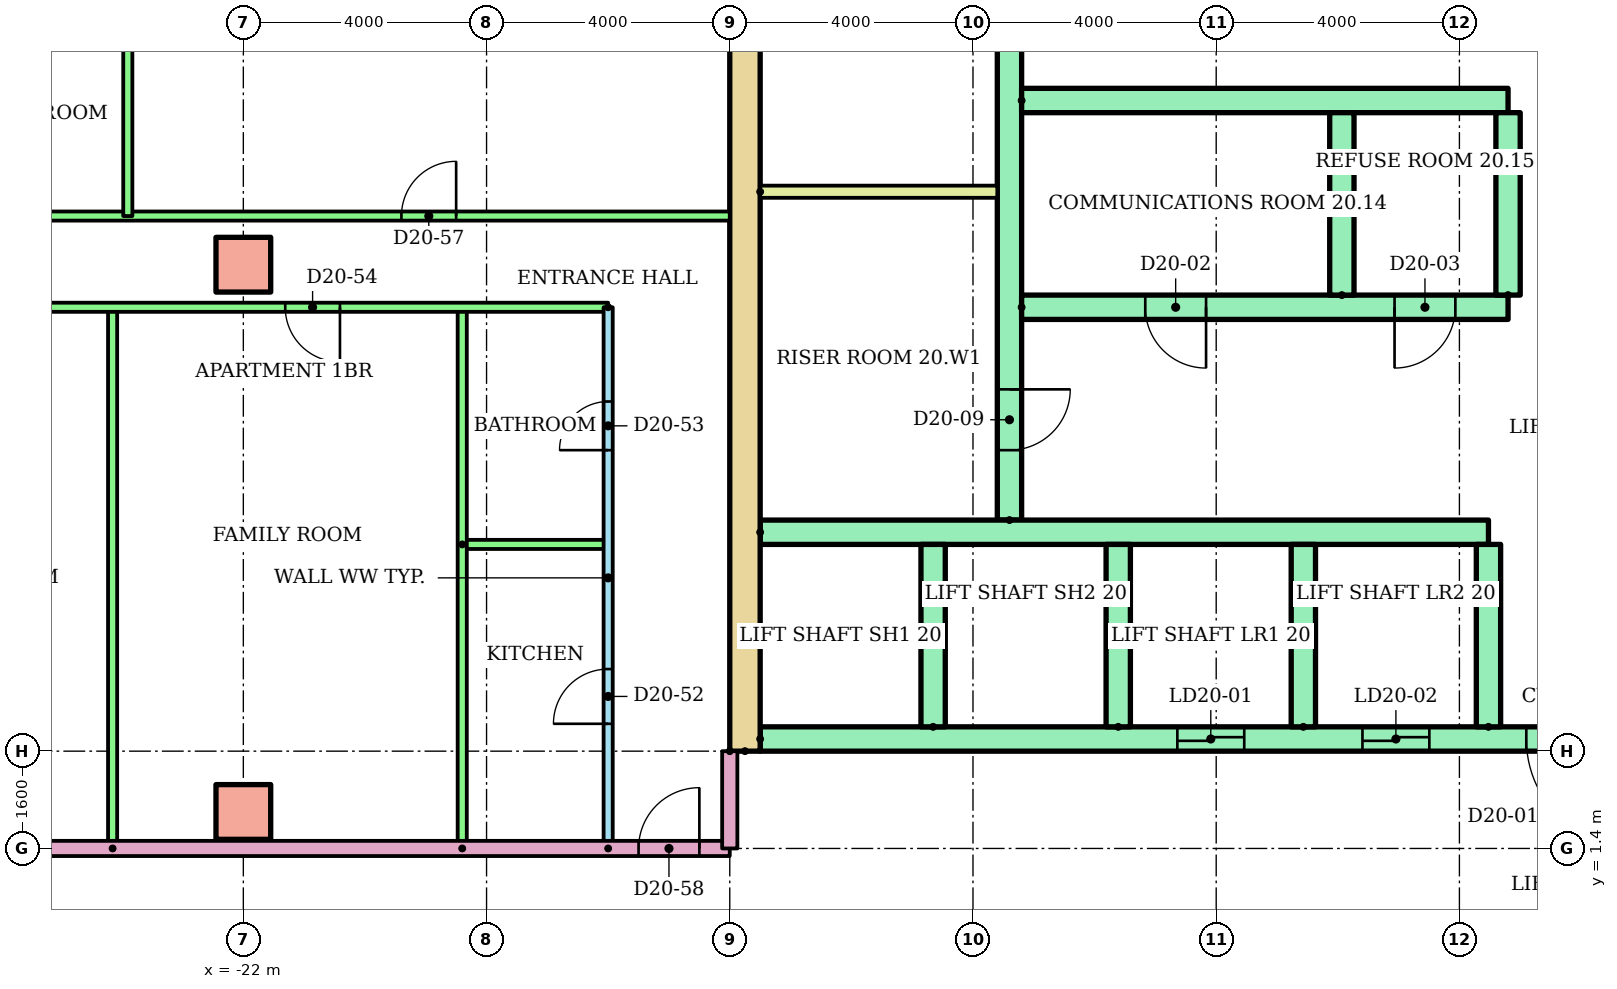
"""IFC4 building model, lengths in metres.
Left out: names, types, materials, properties, quantities, classifications, styles, units other than length and angle.
Written with IfcOpenShell. Run it as: python <this file> out.ifc"""

import sys

from ifc_helpers import new_model, si_unit, direction, frame, frame_2d, origin, origin_2d, place, context, subcontext, project, spatial, rectangle, extrude, element, fill, save


model = new_model("IFC4")
c1 = context("Model", 3, precision=1e-05, world=origin(), true_north=direction((0.0, 1.0)))
c2 = subcontext(c1, "Body", "Model", "MODEL_VIEW")
j1 = project(units=[si_unit("LENGTHUNIT", "METRE"), si_unit("PLANEANGLEUNIT", "RADIAN")], contexts=[c1])
p1 = place(None, origin())
s1 = spatial("IfcSite", under=j1, at=p1, CompositionType="ELEMENT")
p2 = place(p1, origin())
s2 = spatial("IfcBuilding", under=s1, at=p2, CompositionType="ELEMENT")
p3 = place(p2, frame((0.0, 0.0, 80.7)))
s3 = spatial("IfcBuildingStorey", under=s2, at=p3, CompositionType="ELEMENT", Elevation=80.7)
for number, where in (
    (1, (-22.0, 2.0, 0.0)),
    (2, (-22.0, 11.0, 0.0)),
):
    element("IfcColumn", number, at=place(p3, frame(where)), inside=s3, PredefinedType="COLUMN", context=c2, shape_type="SweptSolid", body=[
        extrude(rectangle(XDim=0.9, YDim=0.9, at=origin_2d()), origin(), (0.0, 0.0, 1.0), 3.2),
    ])
p4 = place(p3, frame((-13.75, 3.0, 0.0), z_axis=(0.0, 0.0, 1.0), x_axis=(0.0, 1.0, 0.0)))
e3 = element("IfcWall", 3, at=p4, inside=s3, PredefinedType="SHEAR", context=c2, shape_type="SweptSolid", body=[
    extrude(rectangle(XDim=17.0, YDim=0.5, at=frame_2d((8.5, 0.0))), origin(), (0.0, 0.0, 1.0), 2.92),
])
p5 = place(p3, frame((-9.4, 6.8, 0.0), z_axis=(0.0, 0.0, 1.0), x_axis=(0.0, 1.0, 0.0)))
e4 = element("IfcWall", 4, at=p5, inside=s3, PredefinedType="SHEAR", context=c2, shape_type="SweptSolid", body=[
    extrude(rectangle(XDim=12.7, YDim=0.4, at=frame_2d((6.35, 0.0))), origin(), (0.0, 0.0, 1.0), 2.92),
])
p6 = place(p5, frame((1.15, 0.0, 0.0)))
e5 = element("IfcOpeningElement", 5, at=p6, cuts=e4, PredefinedType="OPENING", context=c2, shape_type="SweptSolid", body=[
    extrude(rectangle(XDim=1.0, YDim=2.1, at=frame_2d((0.5, 1.05))), frame((0.0, 0.21, 0.0), z_axis=(0.0, -1.0, 0.0), x_axis=(1.0, 0.0, 0.0)), (0.0, 0.0, 1.0), 0.42),
])
p7 = place(p5, frame((7.925, 0.0, 0.0)))
e6 = element("IfcOpeningElement", 6, at=p7, cuts=e4, PredefinedType="OPENING", context=c2, shape_type="SweptSolid", body=[
    extrude(rectangle(XDim=1.0, YDim=2.1, at=frame_2d((0.5, 1.05))), frame((0.0, 0.21, 0.0), z_axis=(0.0, -1.0, 0.0), x_axis=(1.0, 0.0, 0.0)), (0.0, 0.0, 1.0), 0.42),
])
p8 = place(p3, frame((-13.5, 3.2, 0.0)))
e7 = element("IfcWall", 7, at=p8, inside=s3, PredefinedType="SHEAR", context=c2, shape_type="SweptSolid", body=[
    extrude(rectangle(XDim=27.0, YDim=0.4, at=frame_2d((13.5, 0.0))), origin(), (0.0, 0.0, 1.0), 2.92),
])
p9 = place(p8, frame((6.861, 0.0, 0.0)))
e8 = element("IfcOpeningElement", 8, at=p9, cuts=e7, PredefinedType="OPENING", context=c2, shape_type="SweptSolid", body=[
    extrude(rectangle(XDim=1.1, YDim=2.1, at=frame_2d((0.55, 1.05))), frame((0.0, 0.21, 0.0), z_axis=(0.0, -1.0, 0.0), x_axis=(1.0, 0.0, 0.0)), (0.0, 0.0, 1.0), 0.42),
])
p10 = place(p8, frame((9.906, 0.0, 0.0)))
e9 = element("IfcOpeningElement", 9, at=p10, cuts=e7, PredefinedType="OPENING", context=c2, shape_type="SweptSolid", body=[
    extrude(rectangle(XDim=1.1, YDim=2.1, at=frame_2d((0.55, 1.05))), frame((0.0, 0.21, 0.0), z_axis=(0.0, -1.0, 0.0), x_axis=(1.0, 0.0, 0.0)), (0.0, 0.0, 1.0), 0.42),
])
p11 = place(p8, frame((15.994, 0.0, 0.0)))
e10 = element("IfcOpeningElement", 10, at=p11, cuts=e7, PredefinedType="OPENING", context=c2, shape_type="SweptSolid", body=[
    extrude(rectangle(XDim=1.1, YDim=2.1, at=frame_2d((0.55, 1.05))), frame((0.0, 0.21, 0.0), z_axis=(0.0, -1.0, 0.0), x_axis=(1.0, 0.0, 0.0)), (0.0, 0.0, 1.0), 0.42),
])
p12 = place(p8, frame((19.039, 0.0, 0.0)))
e11 = element("IfcOpeningElement", 11, at=p12, cuts=e7, PredefinedType="OPENING", context=c2, shape_type="SweptSolid", body=[
    extrude(rectangle(XDim=1.1, YDim=2.1, at=frame_2d((0.55, 1.05))), frame((0.0, 0.21, 0.0), z_axis=(0.0, -1.0, 0.0), x_axis=(1.0, 0.0, 0.0)), (0.0, 0.0, 1.0), 0.42),
])
p13 = place(p8, frame((12.6, 0.0, 0.0)))
e12 = element("IfcOpeningElement", 12, at=p13, cuts=e7, PredefinedType="OPENING", context=c2, shape_type="SweptSolid", body=[
    extrude(rectangle(XDim=1.8, YDim=2.1, at=frame_2d((0.9, 1.05))), frame((0.0, 0.21, 0.0), z_axis=(0.0, -1.0, 0.0), x_axis=(1.0, 0.0, 0.0)), (0.0, 0.0, 1.0), 0.42),
])
p14 = place(p3, frame((-13.5, 6.6, 0.0)))
e13 = element("IfcWall", 13, at=p14, inside=s3, PredefinedType="SHEAR", context=c2, shape_type="SweptSolid", body=[
    extrude(rectangle(XDim=11.978, YDim=0.4, at=frame_2d((5.989, 0.0))), origin(), (0.0, 0.0, 1.0), 2.92),
])
for number, where, z_axis, x_axis in (
    (14, (-10.656, 3.4, 0.0), (0.0, 0.0, 1.0), (0.0, 1.0, 0.0)),
    (15, (-7.611, 3.4, 0.0), (0.0, 0.0, 1.0), (0.0, 1.0, 0.0)),
    (16, (-4.567, 3.4, 0.0), (0.0, 0.0, 1.0), (0.0, 1.0, 0.0)),
    (17, (-1.522, 3.4, 0.0), (0.0, 0.0, 1.0), (0.0, 1.0, 0.0)),
):
    element("IfcWall", number, at=place(p3, frame(where, z_axis=z_axis, x_axis=x_axis)), inside=s3, PredefinedType="SHEAR", context=c2, shape_type="SweptSolid", body=[
        extrude(rectangle(XDim=3.0, YDim=0.4, at=frame_2d((1.5, 0.0))), origin(), (0.0, 0.0, 1.0), 2.92),
    ])
p15 = place(p3, frame((-9.2, 10.3, 0.0)))
e18 = element("IfcWall", 18, at=p15, inside=s3, PredefinedType="SHEAR", context=c2, shape_type="SweptSolid", body=[
    extrude(rectangle(XDim=8.0, YDim=0.4, at=frame_2d((4.0, 0.0))), origin(), (0.0, 0.0, 1.0), 2.92),
])
p16 = place(p15, frame((2.033, 0.0, 0.0)))
e19 = element("IfcOpeningElement", 19, at=p16, cuts=e18, PredefinedType="OPENING", context=c2, shape_type="SweptSolid", body=[
    extrude(rectangle(XDim=1.0, YDim=2.1, at=frame_2d((0.5, 1.05))), frame((0.0, 0.21, 0.0), z_axis=(0.0, -1.0, 0.0), x_axis=(1.0, 0.0, 0.0)), (0.0, 0.0, 1.0), 0.42),
])
p17 = place(p15, frame((6.133, 0.0, 0.0)))
e20 = element("IfcOpeningElement", 20, at=p17, cuts=e18, PredefinedType="OPENING", context=c2, shape_type="SweptSolid", body=[
    extrude(rectangle(XDim=1.0, YDim=2.1, at=frame_2d((0.5, 1.05))), frame((0.0, 0.21, 0.0), z_axis=(0.0, -1.0, 0.0), x_axis=(1.0, 0.0, 0.0)), (0.0, 0.0, 1.0), 0.42),
])
p18 = place(p3, frame((-9.2, 13.7, 0.0)))
e21 = element("IfcWall", 21, at=p18, inside=s3, PredefinedType="SHEAR", context=c2, shape_type="SweptSolid", body=[
    extrude(rectangle(XDim=8.0, YDim=0.4, at=frame_2d((4.0, 0.0))), origin(), (0.0, 0.0, 1.0), 2.92),
])
for number, where, z_axis, x_axis in (
    (22, (-3.933, 10.5, 0.0), (0.0, 0.0, 1.0), (0.0, 1.0, 0.0)),
    (23, (-1.2, 10.5, 0.0), (0.0, 0.0, 1.0), (0.0, 1.0, 0.0)),
):
    element("IfcWall", number, at=place(p3, frame(where, z_axis=z_axis, x_axis=x_axis)), inside=s3, PredefinedType="SHEAR", context=c2, shape_type="SweptSolid", body=[
        extrude(rectangle(XDim=3.0, YDim=0.4, at=frame_2d((1.5, 0.0))), origin(), (0.0, 0.0, 1.0), 2.92),
    ])
p19 = place(p3, frame((-13.5, 12.2, 0.0)))
e24 = element("IfcWall", 24, at=p19, inside=s3, PredefinedType="PARTITIONING", context=c2, shape_type="SweptSolid", body=[
    extrude(rectangle(XDim=3.9, YDim=0.2, at=frame_2d((1.95, 0.0))), origin(), (0.0, 0.0, 1.0), 2.92),
])
p20 = place(p3, frame((-16.0, 1.4, 0.0), z_axis=(0.0, 0.0, 1.0), x_axis=(0.0, 1.0, 0.0)))
e25 = element("IfcWall", 25, at=p20, inside=s3, PredefinedType="PARTITIONING", context=c2, shape_type="SweptSolid", body=[
    extrude(rectangle(XDim=8.9, YDim=0.15, at=frame_2d((4.45, 0.0))), origin(), (0.0, 0.0, 1.0), 2.4),
])
p21 = place(p20, frame((2.05, 0.0, 0.0)))
e26 = element("IfcOpeningElement", 26, at=p21, cuts=e25, PredefinedType="OPENING", context=c2, shape_type="SweptSolid", body=[
    extrude(rectangle(XDim=0.9, YDim=2.1, at=frame_2d((0.45, 1.05))), frame((0.0, 0.085, 0.0), z_axis=(0.0, -1.0, 0.0), x_axis=(1.0, 0.0, 0.0)), (0.0, 0.0, 1.0), 0.17),
])
p22 = place(p20, frame((6.55, 0.0, 0.0)))
e27 = element("IfcOpeningElement", 27, at=p22, cuts=e25, PredefinedType="OPENING", context=c2, shape_type="SweptSolid", body=[
    extrude(rectangle(XDim=0.8, YDim=2.1, at=frame_2d((0.4, 1.05))), frame((0.0, 0.085, 0.0), z_axis=(0.0, -1.0, 0.0), x_axis=(1.0, 0.0, 0.0)), (0.0, 0.0, 1.0), 0.17),
])
p23 = place(p3, frame((-18.4, 6.4, 0.0)))
e28 = element("IfcWall", 28, at=p23, inside=s3, PredefinedType="PARTITIONING", context=c2, shape_type="SweptSolid", body=[
    extrude(rectangle(XDim=2.4, YDim=0.15, at=frame_2d((1.2, 0.0))), origin(), (0.0, 0.0, 1.0), 2.4),
])
for number, where, z_axis, x_axis in (
    (29, (-18.4, 1.4, 0.0), (0.0, 0.0, 1.0), (0.0, 1.0, 0.0)),
    (30, (-24.15, 1.4, 0.0), (0.0, 0.0, 1.0), (0.0, 1.0, 0.0)),
):
    element("IfcWall", number, at=place(p3, frame(where, z_axis=z_axis, x_axis=x_axis)), inside=s3, PredefinedType="PARTITIONING", context=c2, shape_type="SweptSolid", body=[
        extrude(rectangle(XDim=8.9, YDim=0.15, at=frame_2d((4.45, 0.0))), origin(), (0.0, 0.0, 1.0), 2.4),
    ])
p24 = place(p3, frame((-16.0, 10.3, 0.0), z_axis=(0.0, 0.0, 1.0), x_axis=(-1.0, 0.0, 0.0)))
e31 = element("IfcWall", 31, at=p24, inside=s3, PredefinedType="PARTITIONING", context=c2, shape_type="SweptSolid", body=[
    extrude(rectangle(XDim=12.62, YDim=0.15, at=frame_2d((6.31, 0.0))), origin(), (0.0, 0.0, 1.0), 2.4),
])
p25 = place(p24, frame((4.411, 0.0, 0.0)))
e32 = element("IfcOpeningElement", 32, at=p25, cuts=e31, PredefinedType="OPENING", context=c2, shape_type="SweptSolid", body=[
    extrude(rectangle(XDim=0.9, YDim=2.1, at=frame_2d((0.45, 1.05))), frame((0.0, 0.085, 0.0), z_axis=(0.0, -1.0, 0.0), x_axis=(1.0, 0.0, 0.0)), (0.0, 0.0, 1.0), 0.17),
])
p26 = place(p24, frame((9.825, 0.0, 0.0)))
e33 = element("IfcOpeningElement", 33, at=p26, cuts=e31, PredefinedType="OPENING", context=c2, shape_type="SweptSolid", body=[
    extrude(rectangle(XDim=0.9, YDim=2.1, at=frame_2d((0.45, 1.05))), frame((0.0, 0.085, 0.0), z_axis=(0.0, -1.0, 0.0), x_axis=(1.0, 0.0, 0.0)), (0.0, 0.0, 1.0), 0.17),
])
p27 = place(p3, frame((-28.62, 11.8, 0.0)))
e34 = element("IfcWall", 34, at=p27, inside=s3, PredefinedType="PARTITIONING", context=c2, shape_type="SweptSolid", body=[
    extrude(rectangle(XDim=14.62, YDim=0.15, at=frame_2d((7.31, 0.0))), origin(), (0.0, 0.0, 1.0), 2.4),
])
p28 = place(p27, frame((1.97, 0.0, 0.0)))
e35 = element("IfcOpeningElement", 35, at=p28, cuts=e34, PredefinedType="OPENING", context=c2, shape_type="SweptSolid", body=[
    extrude(rectangle(XDim=1.0, YDim=2.1, at=frame_2d((0.5, 1.05))), frame((0.0, 0.085, 0.0), z_axis=(0.0, -1.0, 0.0), x_axis=(1.0, 0.0, 0.0)), (0.0, 0.0, 1.0), 0.17),
])
p29 = place(p27, frame((9.22, 0.0, 0.0)))
e36 = element("IfcOpeningElement", 36, at=p29, cuts=e34, PredefinedType="OPENING", context=c2, shape_type="SweptSolid", body=[
    extrude(rectangle(XDim=0.9, YDim=2.1, at=frame_2d((0.45, 1.05))), frame((0.0, 0.085, 0.0), z_axis=(0.0, -1.0, 0.0), x_axis=(1.0, 0.0, 0.0)), (0.0, 0.0, 1.0), 0.17),
])
p30 = place(p3, frame((-23.9, 16.82, 0.0), z_axis=(0.0, 0.0, 1.0), x_axis=(0.0, -1.0, 0.0)))
e37 = element("IfcWall", 37, at=p30, inside=s3, PredefinedType="PARTITIONING", context=c2, shape_type="SweptSolid", body=[
    extrude(rectangle(XDim=5.02, YDim=0.15, at=frame_2d((2.51, 0.0))), origin(), (0.0, 0.0, 1.0), 2.4),
])
p31 = place(p3, frame((-28.62, 1.4, 0.0)))
e38 = element("IfcWall", 38, at=p31, inside=s3, PredefinedType="PARTITIONING", context=c2, shape_type="SweptSolid", body=[
    extrude(rectangle(XDim=14.62, YDim=0.25, at=frame_2d((7.31, 0.0))), origin(), (0.0, 0.0, 1.0), 2.4),
])
p32 = place(p31, frame((13.12, 0.0, 0.0)))
e39 = element("IfcOpeningElement", 39, at=p32, cuts=e38, PredefinedType="OPENING", context=c2, shape_type="SweptSolid", body=[
    extrude(rectangle(XDim=1.0, YDim=2.1, at=frame_2d((0.5, 1.05))), frame((0.0, 0.135, 0.0), z_axis=(0.0, -1.0, 0.0), x_axis=(1.0, 0.0, 0.0)), (0.0, 0.0, 1.0), 0.27),
])
p33 = place(p3, frame((-14.0, 3.0, 0.0), z_axis=(0.0, 0.0, 1.0), x_axis=(0.0, -1.0, 0.0)))
e40 = element("IfcWall", 40, at=p33, inside=s3, PredefinedType="PARTITIONING", context=c2, shape_type="SweptSolid", body=[
    extrude(rectangle(XDim=1.6, YDim=0.25, at=frame_2d((0.8, 0.0))), origin(), (0.0, 0.0, 1.0), 2.4),
])
p34 = place(p9, origin())
e41 = element("IfcDoor", 41, at=p34, inside=s3, OperationType="SLIDING_TO_LEFT", PredefinedType="DOOR", context=c2, shape_type="SweptSolid", body=[
    extrude(rectangle(XDim=1.1, YDim=2.1, at=frame_2d((0.55, 1.05))), frame((0.0, 0.025, 0.0), z_axis=(0.0, -1.0, 0.0), x_axis=(1.0, 0.0, 0.0)), (0.0, 0.0, 1.0), 0.05),
])
fill(e8, e41)
p35 = place(p10, origin())
e42 = element("IfcDoor", 42, at=p35, inside=s3, OperationType="SLIDING_TO_LEFT", PredefinedType="DOOR", context=c2, shape_type="SweptSolid", body=[
    extrude(rectangle(XDim=1.1, YDim=2.1, at=frame_2d((0.55, 1.05))), frame((0.0, 0.025, 0.0), z_axis=(0.0, -1.0, 0.0), x_axis=(1.0, 0.0, 0.0)), (0.0, 0.0, 1.0), 0.05),
])
fill(e9, e42)
p36 = place(p13, frame((1.8, 0.0, 0.0), z_axis=(0.0, 0.0, 1.0), x_axis=(-1.0, 0.0, 0.0)))
e43 = element("IfcDoor", 43, at=p36, inside=s3, OperationType="DOUBLE_DOOR_SINGLE_SWING", PredefinedType="DOOR", context=c2, shape_type="SweptSolid", body=[
    extrude(rectangle(XDim=1.8, YDim=2.1, at=frame_2d((0.9, 1.05))), frame((0.0, 0.025, 0.0), z_axis=(0.0, -1.0, 0.0), x_axis=(1.0, 0.0, 0.0)), (0.0, 0.0, 1.0), 0.05),
])
fill(e12, e43)
p37 = place(p16, frame((1.0, 0.0, 0.0), z_axis=(0.0, 0.0, 1.0), x_axis=(-1.0, 0.0, 0.0)))
e44 = element("IfcDoor", 44, at=p37, inside=s3, OperationType="SINGLE_SWING_RIGHT", PredefinedType="DOOR", context=c2, shape_type="SweptSolid", body=[
    extrude(rectangle(XDim=1.0, YDim=2.1, at=frame_2d((0.5, 1.05))), frame((0.0, 0.025, 0.0), z_axis=(0.0, -1.0, 0.0), x_axis=(1.0, 0.0, 0.0)), (0.0, 0.0, 1.0), 0.05),
])
fill(e19, e44)
p38 = place(p17, frame((1.0, 0.0, 0.0), z_axis=(0.0, 0.0, 1.0), x_axis=(-1.0, 0.0, 0.0)))
e45 = element("IfcDoor", 45, at=p38, inside=s3, OperationType="SINGLE_SWING_LEFT", PredefinedType="DOOR", context=c2, shape_type="SweptSolid", body=[
    extrude(rectangle(XDim=1.0, YDim=2.1, at=frame_2d((0.5, 1.05))), frame((0.0, 0.025, 0.0), z_axis=(0.0, -1.0, 0.0), x_axis=(1.0, 0.0, 0.0)), (0.0, 0.0, 1.0), 0.05),
])
fill(e20, e45)
p39 = place(p6, frame((1.0, 0.0, 0.0), z_axis=(0.0, 0.0, 1.0), x_axis=(-1.0, 0.0, 0.0)))
e46 = element("IfcDoor", 46, at=p39, inside=s3, OperationType="SINGLE_SWING_RIGHT", PredefinedType="DOOR", context=c2, shape_type="SweptSolid", body=[
    extrude(rectangle(XDim=1.0, YDim=2.1, at=frame_2d((0.5, 1.05))), frame((0.0, 0.025, 0.0), z_axis=(0.0, -1.0, 0.0), x_axis=(1.0, 0.0, 0.0)), (0.0, 0.0, 1.0), 0.05),
])
fill(e5, e46)
p40 = place(p21, origin())
e47 = element("IfcDoor", 47, at=p40, inside=s3, OperationType="SINGLE_SWING_LEFT", PredefinedType="DOOR", context=c2, shape_type="SweptSolid", body=[
    extrude(rectangle(XDim=0.9, YDim=2.1, at=frame_2d((0.45, 1.05))), frame((0.0, 0.025, 0.0), z_axis=(0.0, -1.0, 0.0), x_axis=(1.0, 0.0, 0.0)), (0.0, 0.0, 1.0), 0.05),
])
fill(e26, e47)
p41 = place(p22, origin())
e48 = element("IfcDoor", 48, at=p41, inside=s3, OperationType="SINGLE_SWING_LEFT", PredefinedType="DOOR", context=c2, shape_type="SweptSolid", body=[
    extrude(rectangle(XDim=0.8, YDim=2.1, at=frame_2d((0.4, 1.05))), frame((0.0, 0.025, 0.0), z_axis=(0.0, -1.0, 0.0), x_axis=(1.0, 0.0, 0.0)), (0.0, 0.0, 1.0), 0.05),
])
fill(e27, e48)
p42 = place(p25, origin())
e49 = element("IfcDoor", 49, at=p42, inside=s3, OperationType="SINGLE_SWING_LEFT", PredefinedType="DOOR", context=c2, shape_type="SweptSolid", body=[
    extrude(rectangle(XDim=0.9, YDim=2.1, at=frame_2d((0.45, 1.05))), frame((0.0, 0.025, 0.0), z_axis=(0.0, -1.0, 0.0), x_axis=(1.0, 0.0, 0.0)), (0.0, 0.0, 1.0), 0.05),
])
fill(e32, e49)
p43 = place(p29, origin())
e50 = element("IfcDoor", 50, at=p43, inside=s3, OperationType="SINGLE_SWING_RIGHT", PredefinedType="DOOR", context=c2, shape_type="SweptSolid", body=[
    extrude(rectangle(XDim=0.9, YDim=2.1, at=frame_2d((0.45, 1.05))), frame((0.0, 0.025, 0.0), z_axis=(0.0, -1.0, 0.0), x_axis=(1.0, 0.0, 0.0)), (0.0, 0.0, 1.0), 0.05),
])
fill(e36, e50)
p44 = place(p32, origin())
e51 = element("IfcDoor", 51, at=p44, inside=s3, OperationType="SINGLE_SWING_RIGHT", PredefinedType="DOOR", context=c2, shape_type="SweptSolid", body=[
    extrude(rectangle(XDim=1.0, YDim=2.1, at=frame_2d((0.5, 1.05))), frame((0.0, 0.025, 0.0), z_axis=(0.0, -1.0, 0.0), x_axis=(1.0, 0.0, 0.0)), (0.0, 0.0, 1.0), 0.05),
])
fill(e39, e51)
save(model, sys.argv[1])
